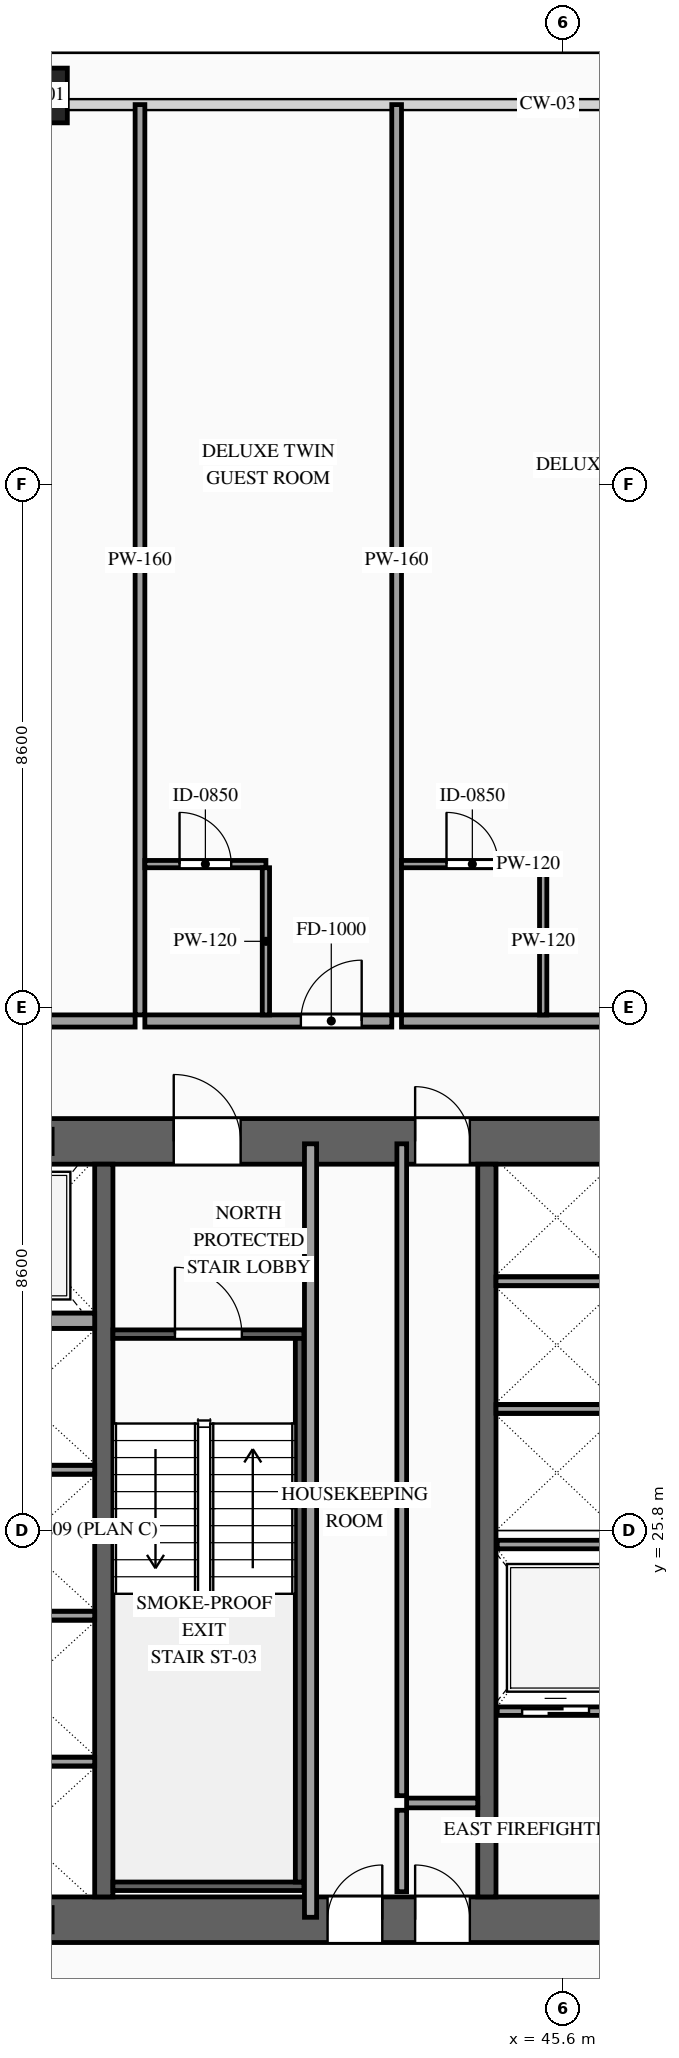
"""IFC4 building model, lengths in metres.
Left out: names, types, materials, properties, quantities, classifications, styles, units other than length and angle.
Written with IfcOpenShell. Run it as: python <this file> out.ifc"""

import sys

from ifc_helpers import new_model, si_unit, direction, frame, frame_2d, origin, origin_2d, place, context, subcontext, project, spatial, rectangle, hollow_rectangle, extrude, source, transform, mapped, element, fill, save


model = new_model("IFC4")
c1 = context("Model", 3, precision=1e-05, world=origin(), true_north=direction((0.0, 1.0)))
c2 = subcontext(c1, "Body", "Model", "MODEL_VIEW")
j1 = project(units=[si_unit("LENGTHUNIT", "METRE"), si_unit("PLANEANGLEUNIT", "RADIAN")], contexts=[c1])
p1 = place(None, origin())
s1 = spatial("IfcSite", under=j1, at=p1, CompositionType="ELEMENT")
p2 = place(p1, origin())
s2 = spatial("IfcBuilding", under=s1, at=p2, CompositionType="ELEMENT")
p3 = place(p2, frame((0.0, 0.0, 145.2)))
s3 = spatial("IfcBuildingStorey", under=s2, at=p3, CompositionType="ELEMENT", Elevation=145.2)
p4 = place(p3, frame((23.425, 19.4, 0.0), z_axis=(0.0, 0.0, 1.0), x_axis=(1.0, 0.0, 0.0)))
e1 = element("IfcWall", 1, at=p4, inside=s3, PredefinedType="SHEAR", context=c2, shape_type="SweptSolid", body=[
    extrude(rectangle(XDim=27.15, YDim=0.75, at=frame_2d((13.575, 0.0))), origin(), (0.0, 0.0, 1.0), 3.6),
])
p5 = place(p4, frame((2.025, 0.0, 0.0)))
e2 = element("IfcOpeningElement", 2, at=p5, cuts=e1, PredefinedType="OPENING", context=c2, shape_type="SweptSolid", body=[
    extrude(rectangle(XDim=1.1, YDim=2.2, at=frame_2d((0.55, 1.1))), frame((0.0, 0.39, 0.0), z_axis=(0.0, -1.0, 0.0), x_axis=(1.0, 0.0, 0.0)), (0.0, 0.0, 1.0), 0.78),
])
p6 = place(p4, frame((9.925, 0.0, 0.0)))
e3 = element("IfcOpeningElement", 3, at=p6, cuts=e1, PredefinedType="OPENING", context=c2, shape_type="SweptSolid", body=[
    extrude(rectangle(XDim=1.1, YDim=2.2, at=frame_2d((0.55, 1.1))), frame((0.0, 0.39, 0.0), z_axis=(0.0, -1.0, 0.0), x_axis=(1.0, 0.0, 0.0)), (0.0, 0.0, 1.0), 0.78),
])
p7 = place(p4, frame((23.125, 0.0, 0.0)))
e4 = element("IfcOpeningElement", 4, at=p7, cuts=e1, PredefinedType="OPENING", context=c2, shape_type="SweptSolid", body=[
    extrude(rectangle(XDim=1.1, YDim=2.2, at=frame_2d((0.55, 1.1))), frame((0.0, 0.39, 0.0), z_axis=(0.0, -1.0, 0.0), x_axis=(1.0, 0.0, 0.0)), (0.0, 0.0, 1.0), 0.78),
])
p8 = place(p4, frame((19.745, 0.0, 0.0)))
e5 = element("IfcOpeningElement", 5, at=p8, cuts=e1, PredefinedType="OPENING", context=c2, shape_type="SweptSolid", body=[
    extrude(rectangle(XDim=0.9, YDim=2.15, at=frame_2d((0.45, 1.075))), frame((0.0, 0.39, 0.0), z_axis=(0.0, -1.0, 0.0), x_axis=(1.0, 0.0, 0.0)), (0.0, 0.0, 1.0), 0.78),
])
p9 = place(p4, frame((18.305, 0.0, 0.0)))
e6 = element("IfcOpeningElement", 6, at=p9, cuts=e1, PredefinedType="OPENING", context=c2, shape_type="SweptSolid", body=[
    extrude(rectangle(XDim=0.9, YDim=2.15, at=frame_2d((0.45, 1.075))), frame((0.0, 0.39, 0.0), z_axis=(0.0, -1.0, 0.0), x_axis=(1.0, 0.0, 0.0)), (0.0, 0.0, 1.0), 0.78),
])
p10 = place(p3, frame((23.425, 32.2, 0.0), z_axis=(0.0, 0.0, 1.0), x_axis=(1.0, 0.0, 0.0)))
e7 = element("IfcWall", 7, at=p10, inside=s3, PredefinedType="SHEAR", context=c2, shape_type="SweptSolid", body=[
    extrude(rectangle(XDim=27.15, YDim=0.75, at=frame_2d((13.575, 0.0))), origin(), (0.0, 0.0, 1.0), 3.6),
])
p11 = place(p10, frame((4.645, 0.0, 0.0)))
e8 = element("IfcOpeningElement", 8, at=p11, cuts=e7, PredefinedType="OPENING", context=c2, shape_type="SweptSolid", body=[
    extrude(rectangle(XDim=0.9, YDim=2.15, at=frame_2d((0.45, 1.075))), frame((0.0, 0.39, 0.0), z_axis=(0.0, -1.0, 0.0), x_axis=(1.0, 0.0, 0.0)), (0.0, 0.0, 1.0), 0.78),
])
p12 = place(p10, frame((9.925, 0.0, 0.0)))
e9 = element("IfcOpeningElement", 9, at=p12, cuts=e7, PredefinedType="OPENING", context=c2, shape_type="SweptSolid", body=[
    extrude(rectangle(XDim=1.1, YDim=2.2, at=frame_2d((0.55, 1.1))), frame((0.0, 0.39, 0.0), z_axis=(0.0, -1.0, 0.0), x_axis=(1.0, 0.0, 0.0)), (0.0, 0.0, 1.0), 0.78),
])
p13 = place(p10, frame((15.775, 0.0, 0.0)))
e10 = element("IfcOpeningElement", 10, at=p13, cuts=e7, PredefinedType="OPENING", context=c2, shape_type="SweptSolid", body=[
    extrude(rectangle(XDim=1.1, YDim=2.2, at=frame_2d((0.55, 1.1))), frame((0.0, 0.39, 0.0), z_axis=(0.0, -1.0, 0.0), x_axis=(1.0, 0.0, 0.0)), (0.0, 0.0, 1.0), 0.78),
])
p14 = place(p10, frame((19.745, 0.0, 0.0)))
e11 = element("IfcOpeningElement", 11, at=p14, cuts=e7, PredefinedType="OPENING", context=c2, shape_type="SweptSolid", body=[
    extrude(rectangle(XDim=0.9, YDim=2.15, at=frame_2d((0.45, 1.075))), frame((0.0, 0.39, 0.0), z_axis=(0.0, -1.0, 0.0), x_axis=(1.0, 0.0, 0.0)), (0.0, 0.0, 1.0), 0.78),
])
m1 = source(origin(), c2, "Body", "SweptSolid", [
    extrude(rectangle(XDim=12.05, YDim=0.3, at=frame_2d((6.025, 0.0))), origin(), (0.0, 0.0, 1.0), 3.6),
])
for number, where, z_axis, x_axis in (
    (12, (38.05, 19.775, 0.0), (0.0, 0.0, 1.0), (0.0, 1.0, 0.0)),
    (13, (44.35, 19.775, 0.0), (0.0, 0.0, 1.0), (0.0, 1.0, 0.0)),
):
    element("IfcWall", number, at=place(p3, frame(where, z_axis=z_axis, x_axis=x_axis)), inside=s3, PredefinedType="SOLIDWALL", context=c2, shape_type="MappedRepresentation", body=[
        mapped(m1, transform((0.0, 0.0, 0.0), scale=1.0)),
    ])
m2 = source(origin(), c2, "Body", "SweptSolid", [
    extrude(hollow_rectangle(XDim=0.9, YDim=0.9, WallThickness=0.042, at=origin_2d()), origin(), (0.0, 0.0, 1.0), 3.6),
])
p15 = place(p3, frame((37.0, 49.4, 0.0), z_axis=(0.0, 0.0, 1.0), x_axis=(1.0, 0.0, 0.0)))
e14 = element("IfcColumn", 14, at=p15, inside=s3, PredefinedType="COLUMN", context=c2, shape_type="MappedRepresentation", body=[
    mapped(m2, transform((0.0, 0.0, 0.0), scale=1.0)),
])
p16 = place(p3, frame((44.52, 22.83, 0.0), z_axis=(0.0, 0.0, 1.0), x_axis=(1.0, 0.0, 0.0)))
e15 = element("IfcWall", 15, at=p16, inside=s3, PredefinedType="SOLIDWALL", context=c2, shape_type="SweptSolid", body=[
    extrude(rectangle(XDim=1.92, YDim=0.14, at=frame_2d((0.96, 0.0))), origin(), (0.0, 0.0, 1.0), 3.38),
])
p17 = place(p16, frame((0.41, 0.0, 0.0)))
e16 = element("IfcOpeningElement", 16, at=p17, cuts=e15, PredefinedType="OPENING", context=c2, shape_type="SweptSolid", body=[
    extrude(rectangle(XDim=1.1, YDim=2.2, at=frame_2d((0.55, 1.1))), frame((0.0, 0.085, 0.0), z_axis=(0.0, -1.0, 0.0), x_axis=(1.0, 0.0, 0.0)), (0.0, 0.0, 1.0), 0.17),
])
m3 = source(origin(), c2, "Body", "SweptSolid", [
    extrude(rectangle(XDim=1.92, YDim=0.14, at=frame_2d((0.96, 0.0))), origin(), (0.0, 0.0, 1.0), 3.38),
])
p18 = place(p3, frame((44.52, 25.57, 0.0), z_axis=(0.0, 0.0, 1.0), x_axis=(1.0, 0.0, 0.0)))
e17 = element("IfcWall", 17, at=p18, inside=s3, PredefinedType="SOLIDWALL", context=c2, shape_type="MappedRepresentation", body=[
    mapped(m3, transform((0.0, 0.0, 0.0), scale=1.0)),
])
m4 = source(origin(), c2, "Body", "SweptSolid", [
    extrude(rectangle(XDim=2.4, YDim=0.14, at=frame_2d((1.2, 0.0))), origin(), (0.0, 0.0, 1.0), 3.38),
])
for number, where, z_axis, x_axis in (
    (18, (35.5, 22.0, 0.0), (0.0, 0.0, 1.0), (1.0, 0.0, 0.0)),
    (19, (35.5, 24.4, 0.0), (0.0, 0.0, 1.0), (1.0, 0.0, 0.0)),
    (20, (35.5, 26.8, 0.0), (0.0, 0.0, 1.0), (1.0, 0.0, 0.0)),
):
    element("IfcWall", number, at=place(p3, frame(where, z_axis=z_axis, x_axis=x_axis)), inside=s3, PredefinedType="SOLIDWALL", context=c2, shape_type="MappedRepresentation", body=[
        mapped(m4, transform((0.0, 0.0, 0.0), scale=1.0)),
    ])
m5 = source(origin(), c2, "Body", "SweptSolid", [
    extrude(rectangle(XDim=2.4, YDim=0.25, at=frame_2d((1.2, 0.0))), origin(), (0.0, 0.0, 1.0), 3.38),
])
p19 = place(p3, frame((35.5, 29.25, 0.0), z_axis=(0.0, 0.0, 1.0), x_axis=(1.0, 0.0, 0.0)))
e21 = element("IfcWall", 21, at=p19, inside=s3, PredefinedType="SOLIDWALL", context=c2, shape_type="MappedRepresentation", body=[
    mapped(m5, transform((0.0, 0.0, 0.0), scale=1.0)),
])
m6 = source(origin(), c2, "Body", "SweptSolid", [
    extrude(rectangle(XDim=2.0, YDim=0.14, at=frame_2d((1.0, 0.0))), origin(), (0.0, 0.0, 1.0), 3.38),
])
for number, where, z_axis, x_axis in (
    (22, (44.5, 27.8, 0.0), (0.0, 0.0, 1.0), (1.0, 0.0, 0.0)),
    (23, (44.5, 29.9, 0.0), (0.0, 0.0, 1.0), (1.0, 0.0, 0.0)),
):
    element("IfcWall", number, at=place(p3, frame(where, z_axis=z_axis, x_axis=x_axis)), inside=s3, PredefinedType="SOLIDWALL", context=c2, shape_type="MappedRepresentation", body=[
        mapped(m6, transform((0.0, 0.0, 0.0), scale=1.0)),
    ])
p20 = place(p3, frame((38.2, 29.03, 0.0), z_axis=(0.0, 0.0, 1.0), x_axis=(1.0, 0.0, 0.0)))
e24 = element("IfcWall", 24, at=p20, inside=s3, PredefinedType="SOLIDWALL", context=c2, shape_type="SweptSolid", body=[
    extrude(rectangle(XDim=3.14, YDim=0.14, at=frame_2d((1.57, 0.0))), origin(), (0.0, 0.0, 1.0), 3.38),
])
p21 = place(p20, frame((1.02, 0.0, 0.0)))
e25 = element("IfcOpeningElement", 25, at=p21, cuts=e24, PredefinedType="OPENING", context=c2, shape_type="SweptSolid", body=[
    extrude(rectangle(XDim=1.1, YDim=2.2, at=frame_2d((0.55, 1.1))), frame((0.0, 0.085, 0.0), z_axis=(0.0, -1.0, 0.0), x_axis=(1.0, 0.0, 0.0)), (0.0, 0.0, 1.0), 0.17),
])
m7 = source(origin(), c2, "Body", "SweptSolid", [
    extrude(rectangle(XDim=3.14, YDim=0.14, at=frame_2d((1.57, 0.0))), origin(), (0.0, 0.0, 1.0), 3.38),
])
p22 = place(p3, frame((38.2, 19.95, 0.0), z_axis=(0.0, 0.0, 1.0), x_axis=(1.0, 0.0, 0.0)))
e26 = element("IfcWall", 26, at=p22, inside=s3, PredefinedType="SOLIDWALL", context=c2, shape_type="MappedRepresentation", body=[
    mapped(m7, transform((0.0, 0.0, 0.0), scale=1.0)),
])
m8 = source(origin(), c2, "Body", "SweptSolid", [
    extrude(rectangle(XDim=8.94, YDim=0.14, at=frame_2d((4.47, 0.0))), origin(), (0.0, 0.0, 1.0), 3.38),
])
p23 = place(p3, frame((41.27, 20.02, 0.0), z_axis=(0.0, 0.0, 1.0), x_axis=(0.0, 1.0, 0.0)))
e27 = element("IfcWall", 27, at=p23, inside=s3, PredefinedType="SOLIDWALL", context=c2, shape_type="MappedRepresentation", body=[
    mapped(m8, transform((0.0, 0.0, 0.0), scale=1.0)),
])
m9 = source(origin(), c2, "Body", "SweptSolid", [
    extrude(rectangle(XDim=1.34, YDim=0.16, at=frame_2d((0.67, 0.0))), origin(), (0.0, 0.0, 1.0), 3.38),
])
p24 = place(p3, frame((42.95, 19.86, 0.0), z_axis=(0.0, 0.0, 1.0), x_axis=(0.0, 1.0, 0.0)))
e28 = element("IfcWall", 28, at=p24, inside=s3, PredefinedType="PARTITIONING", context=c2, shape_type="MappedRepresentation", body=[
    mapped(m9, transform((0.0, 0.0, 0.0), scale=1.0)),
])
m10 = source(origin(), c2, "Body", "SweptSolid", [
    extrude(rectangle(XDim=1.17, YDim=0.16, at=frame_2d((0.585, 0.0))), origin(), (0.0, 0.0, 1.0), 3.38),
])
p25 = place(p3, frame((43.03, 21.32, 0.0), z_axis=(0.0, 0.0, 1.0), x_axis=(1.0, 0.0, 0.0)))
e29 = element("IfcWall", 29, at=p25, inside=s3, PredefinedType="PARTITIONING", context=c2, shape_type="MappedRepresentation", body=[
    mapped(m10, transform((0.0, 0.0, 0.0), scale=1.0)),
])
m11 = source(origin(), c2, "Body", "SweptSolid", [
    extrude(rectangle(XDim=12.72, YDim=0.2, at=frame_2d((6.36, 0.0))), origin(), (0.0, 0.0, 1.0), 3.38),
])
p26 = place(p3, frame((41.45, 19.44, 0.0), z_axis=(0.0, 0.0, 1.0), x_axis=(0.0, 1.0, 0.0)))
e30 = element("IfcWall", 30, at=p26, inside=s3, PredefinedType="PARTITIONING", context=c2, shape_type="MappedRepresentation", body=[
    mapped(m11, transform((0.0, 0.0, 0.0), scale=1.0)),
])
m12 = source(origin(), c2, "Body", "SweptSolid", [
    extrude(rectangle(XDim=10.72, YDim=0.16, at=frame_2d((5.36, 0.0))), origin(), (0.0, 0.0, 1.0), 3.38),
])
p27 = place(p3, frame((42.95, 21.44, 0.0), z_axis=(0.0, 0.0, 1.0), x_axis=(0.0, 1.0, 0.0)))
e31 = element("IfcWall", 31, at=p27, inside=s3, PredefinedType="PARTITIONING", context=c2, shape_type="MappedRepresentation", body=[
    mapped(m12, transform((0.0, 0.0, 0.0), scale=1.0)),
])
p28 = place(p3, frame((29.24, 34.18, 0.0), z_axis=(0.0, 0.0, 1.0), x_axis=(1.0, 0.0, 0.0)))
e32 = element("IfcWall", 32, at=p28, inside=s3, PredefinedType="PARTITIONING", context=c2, shape_type="SweptSolid", body=[
    extrude(rectangle(XDim=9.325, YDim=0.2, at=frame_2d((4.663, 0.0))), origin(), (0.0, 0.0, 1.0), 3.38),
])
p29 = place(p28, frame((5.368, 0.0, 0.0)))
e33 = element("IfcOpeningElement", 33, at=p29, cuts=e32, PredefinedType="OPENING", context=c2, shape_type="SweptSolid", body=[
    extrude(rectangle(XDim=1.0, YDim=2.2, at=frame_2d((0.5, 1.1))), frame((0.0, 0.115, 0.0), z_axis=(0.0, -1.0, 0.0), x_axis=(1.0, 0.0, 0.0)), (0.0, 0.0, 1.0), 0.23),
])
m13 = source(origin(), c2, "Body", "SweptSolid", [
    extrude(rectangle(XDim=14.97, YDim=0.16, at=frame_2d((7.485, 0.0))), origin(), (0.0, 0.0, 1.0), 3.38),
])
p30 = place(p3, frame((38.645, 34.28, 0.0), z_axis=(0.0, 0.0, 1.0), x_axis=(0.0, 1.0, 0.0)))
e34 = element("IfcWall", 34, at=p30, inside=s3, PredefinedType="PARTITIONING", context=c2, shape_type="MappedRepresentation", body=[
    mapped(m13, transform((0.0, 0.0, 0.0), scale=1.0)),
])
p31 = place(p3, frame((38.725, 34.18, 0.0), z_axis=(0.0, 0.0, 1.0), x_axis=(1.0, 0.0, 0.0)))
e35 = element("IfcWall", 35, at=p31, inside=s3, PredefinedType="PARTITIONING", context=c2, shape_type="SweptSolid", body=[
    extrude(rectangle(XDim=4.061, YDim=0.2, at=frame_2d((2.03, 0.0))), origin(), (0.0, 0.0, 1.0), 3.38),
])
p32 = place(p31, frame((2.566, 0.0, 0.0)))
e36 = element("IfcOpeningElement", 36, at=p32, cuts=e35, PredefinedType="OPENING", context=c2, shape_type="SweptSolid", body=[
    extrude(rectangle(XDim=1.0, YDim=2.2, at=frame_2d((0.5, 1.1))), frame((0.0, 0.115, 0.0), z_axis=(0.0, -1.0, 0.0), x_axis=(1.0, 0.0, 0.0)), (0.0, 0.0, 1.0), 0.23),
])
p33 = place(p3, frame((42.866, 34.28, 0.0), z_axis=(0.0, 0.0, 1.0), x_axis=(0.0, 1.0, 0.0)))
e37 = element("IfcWall", 37, at=p33, inside=s3, PredefinedType="PARTITIONING", context=c2, shape_type="MappedRepresentation", body=[
    mapped(m13, transform((0.0, 0.0, 0.0), scale=1.0)),
])
p34 = place(p3, frame((38.725, 36.76, 0.0), z_axis=(0.0, 0.0, 1.0), x_axis=(1.0, 0.0, 0.0)))
e38 = element("IfcWall", 38, at=p34, inside=s3, PredefinedType="PARTITIONING", context=c2, shape_type="SweptSolid", body=[
    extrude(rectangle(XDim=1.991, YDim=0.12, at=frame_2d((0.996, 0.0))), origin(), (0.0, 0.0, 1.0), 3.38),
])
p35 = place(p34, frame((0.571, 0.0, 0.0)))
e39 = element("IfcOpeningElement", 39, at=p35, cuts=e38, PredefinedType="OPENING", context=c2, shape_type="SweptSolid", body=[
    extrude(rectangle(XDim=0.85, YDim=2.1, at=frame_2d((0.425, 1.05))), frame((0.0, 0.075, 0.0), z_axis=(0.0, -1.0, 0.0), x_axis=(1.0, 0.0, 0.0)), (0.0, 0.0, 1.0), 0.15),
])
m14 = source(origin(), c2, "Body", "SweptSolid", [
    extrude(rectangle(XDim=2.42, YDim=0.12, at=frame_2d((1.21, 0.0))), origin(), (0.0, 0.0, 1.0), 3.38),
])
p36 = place(p3, frame((40.716, 34.28, 0.0), z_axis=(0.0, 0.0, 1.0), x_axis=(0.0, 1.0, 0.0)))
e40 = element("IfcWall", 40, at=p36, inside=s3, PredefinedType="PARTITIONING", context=c2, shape_type="MappedRepresentation", body=[
    mapped(m14, transform((0.0, 0.0, 0.0), scale=1.0)),
])
p37 = place(p3, frame((42.946, 34.18, 0.0), z_axis=(0.0, 0.0, 1.0), x_axis=(1.0, 0.0, 0.0)))
e41 = element("IfcWall", 41, at=p37, inside=s3, PredefinedType="PARTITIONING", context=c2, shape_type="SweptSolid", body=[
    extrude(rectangle(XDim=8.777, YDim=0.2, at=frame_2d((4.388, 0.0))), origin(), (0.0, 0.0, 1.0), 3.38),
])
p38 = place(p37, frame((5.093, 0.0, 0.0)))
e42 = element("IfcOpeningElement", 42, at=p38, cuts=e41, PredefinedType="OPENING", context=c2, shape_type="SweptSolid", body=[
    extrude(rectangle(XDim=1.0, YDim=2.2, at=frame_2d((0.5, 1.1))), frame((0.0, 0.115, 0.0), z_axis=(0.0, -1.0, 0.0), x_axis=(1.0, 0.0, 0.0)), (0.0, 0.0, 1.0), 0.23),
])
p39 = place(p3, frame((42.946, 36.76, 0.0), z_axis=(0.0, 0.0, 1.0), x_axis=(1.0, 0.0, 0.0)))
e43 = element("IfcWall", 43, at=p39, inside=s3, PredefinedType="PARTITIONING", context=c2, shape_type="SweptSolid", body=[
    extrude(rectangle(XDim=2.33, YDim=0.12, at=frame_2d((1.165, 0.0))), origin(), (0.0, 0.0, 1.0), 3.38),
])
p40 = place(p39, frame((0.74, 0.0, 0.0)))
e44 = element("IfcOpeningElement", 44, at=p40, cuts=e43, PredefinedType="OPENING", context=c2, shape_type="SweptSolid", body=[
    extrude(rectangle(XDim=0.85, YDim=2.1, at=frame_2d((0.425, 1.05))), frame((0.0, 0.075, 0.0), z_axis=(0.0, -1.0, 0.0), x_axis=(1.0, 0.0, 0.0)), (0.0, 0.0, 1.0), 0.15),
])
p41 = place(p3, frame((45.276, 34.28, 0.0), z_axis=(0.0, 0.0, 1.0), x_axis=(0.0, 1.0, 0.0)))
e45 = element("IfcWall", 45, at=p41, inside=s3, PredefinedType="PARTITIONING", context=c2, shape_type="MappedRepresentation", body=[
    mapped(m14, transform((0.0, 0.0, 0.0), scale=1.0)),
])
m15 = source(origin(), c2, "Body", "SweptSolid", [
    extrude(rectangle(XDim=1.1, YDim=2.2, at=frame_2d((0.55, 1.1))), frame((0.0, 0.025, 0.0), z_axis=(0.0, -1.0, 0.0), x_axis=(1.0, 0.0, 0.0)), (0.0, 0.0, 1.0), 0.05),
])
p42 = place(p17, origin())
e46 = element("IfcDoor", 46, at=p42, inside=s3, OperationType="SLIDING_TO_RIGHT", PredefinedType="DOOR", context=c2, shape_type="MappedRepresentation", body=[
    mapped(m15, transform((0.0, 0.0, 0.0), scale=1.0)),
])
fill(e16, e46)
m16 = source(origin(), c2, "Body", "SweptSolid", [
    extrude(rectangle(XDim=1.1, YDim=2.2, at=frame_2d((0.55, 1.1))), frame((0.0, 0.025, 0.0), z_axis=(0.0, -1.0, 0.0), x_axis=(1.0, 0.0, 0.0)), (0.0, 0.0, 1.0), 0.05),
])
p43 = place(p21, origin())
e47 = element("IfcDoor", 47, at=p43, inside=s3, OperationType="SINGLE_SWING_LEFT", PredefinedType="DOOR", context=c2, shape_type="MappedRepresentation", body=[
    mapped(m16, transform((0.0, 0.0, 0.0), scale=1.0)),
])
fill(e25, e47)
p44 = place(p13, origin())
e48 = element("IfcDoor", 48, at=p44, inside=s3, OperationType="SINGLE_SWING_LEFT", PredefinedType="DOOR", context=c2, shape_type="MappedRepresentation", body=[
    mapped(m16, transform((0.0, 0.0, 0.0), scale=1.0)),
])
fill(e10, e48)
m17 = source(origin(), c2, "Body", "SweptSolid", [
    extrude(rectangle(XDim=0.9, YDim=2.15, at=frame_2d((0.45, 1.075))), frame((0.0, 0.025, 0.0), z_axis=(0.0, -1.0, 0.0), x_axis=(1.0, 0.0, 0.0)), (0.0, 0.0, 1.0), 0.05),
])
p45 = place(p8, origin())
e49 = element("IfcDoor", 49, at=p45, inside=s3, OperationType="SINGLE_SWING_LEFT", PredefinedType="DOOR", context=c2, shape_type="MappedRepresentation", body=[
    mapped(m17, transform((0.0, 0.0, 0.0), scale=1.0)),
])
fill(e5, e49)
p46 = place(p9, origin())
e50 = element("IfcDoor", 50, at=p46, inside=s3, OperationType="SINGLE_SWING_RIGHT", PredefinedType="DOOR", context=c2, shape_type="MappedRepresentation", body=[
    mapped(m17, transform((0.0, 0.0, 0.0), scale=1.0)),
])
fill(e6, e50)
p47 = place(p14, origin())
e51 = element("IfcDoor", 51, at=p47, inside=s3, OperationType="SINGLE_SWING_LEFT", PredefinedType="DOOR", context=c2, shape_type="MappedRepresentation", body=[
    mapped(m17, transform((0.0, 0.0, 0.0), scale=1.0)),
])
fill(e11, e51)
m18 = source(origin(), c2, "Body", "SweptSolid", [
    extrude(rectangle(XDim=1.0, YDim=2.2, at=frame_2d((0.5, 1.1))), frame((0.0, 0.025, 0.0), z_axis=(0.0, -1.0, 0.0), x_axis=(1.0, 0.0, 0.0)), (0.0, 0.0, 1.0), 0.05),
])
p48 = place(p32, origin())
e52 = element("IfcDoor", 52, at=p48, inside=s3, OperationType="SINGLE_SWING_RIGHT", PredefinedType="DOOR", context=c2, shape_type="MappedRepresentation", body=[
    mapped(m18, transform((0.0, 0.0, 0.0), scale=1.0)),
])
fill(e36, e52)
m19 = source(origin(), c2, "Body", "SweptSolid", [
    extrude(rectangle(XDim=0.85, YDim=2.1, at=frame_2d((0.425, 1.05))), frame((0.0, 0.025, 0.0), z_axis=(0.0, -1.0, 0.0), x_axis=(1.0, 0.0, 0.0)), (0.0, 0.0, 1.0), 0.05),
])
p49 = place(p35, origin())
e53 = element("IfcDoor", 53, at=p49, inside=s3, OperationType="SINGLE_SWING_LEFT", PredefinedType="DOOR", context=c2, shape_type="MappedRepresentation", body=[
    mapped(m19, transform((0.0, 0.0, 0.0), scale=1.0)),
])
fill(e39, e53)
p50 = place(p40, origin())
e54 = element("IfcDoor", 54, at=p50, inside=s3, OperationType="SINGLE_SWING_LEFT", PredefinedType="DOOR", context=c2, shape_type="MappedRepresentation", body=[
    mapped(m19, transform((0.0, 0.0, 0.0), scale=1.0)),
])
fill(e44, e54)
save(model, sys.argv[1])
